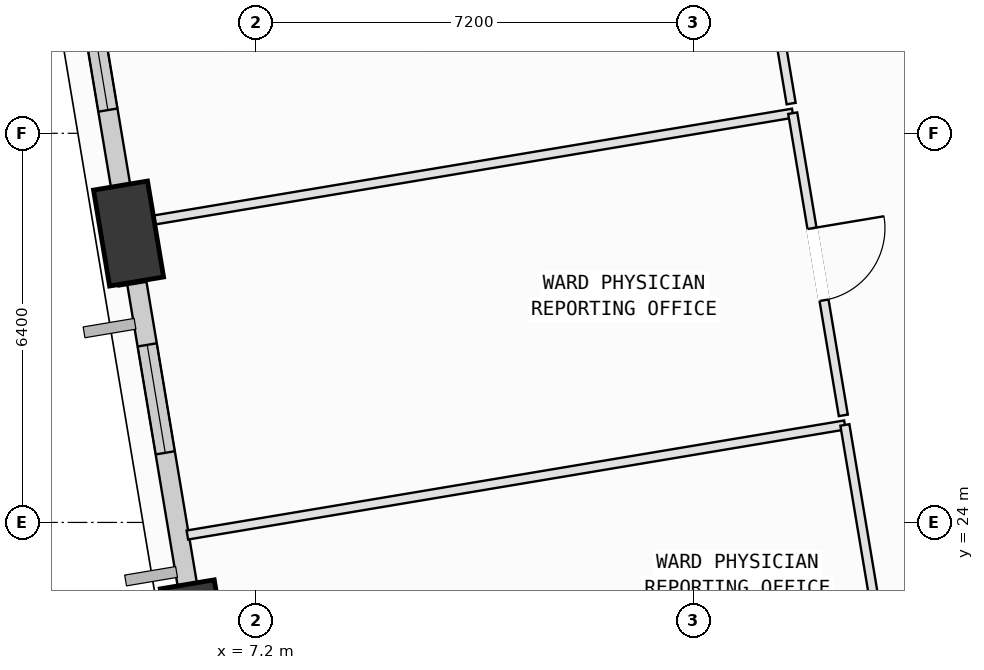
"""IFC4 building model, lengths in metres.
Left out: names, types, materials, properties, quantities, classifications, styles, units other than length and angle.
Written with IfcOpenShell. Run it as: python <this file> out.ifc"""

import sys

from ifc_helpers import new_model, si_unit, direction, frame, frame_2d, origin, origin_2d, place, context, subcontext, project, spatial, rectangle, extrude, element, fill, save


model = new_model("IFC4")
c1 = context("Model", 3, precision=1e-05, world=origin(), true_north=direction((0.0, 1.0)))
c2 = subcontext(c1, "Body", "Model", "MODEL_VIEW")
j1 = project(units=[si_unit("LENGTHUNIT", "METRE"), si_unit("PLANEANGLEUNIT", "RADIAN")], contexts=[c1])
p1 = place(None, origin())
s1 = spatial("IfcSite", under=j1, at=p1, CompositionType="ELEMENT")
p2 = place(p1, origin())
s2 = spatial("IfcBuilding", under=s1, at=p2, CompositionType="ELEMENT")
p3 = place(p2, frame((0.0, 0.0, 63.0)))
s3 = spatial("IfcBuildingStorey", under=s2, at=p3, CompositionType="ELEMENT", Elevation=63.0)
p4 = place(p3, frame((5.107, 28.751, 0.002), z_axis=(-0.015285797262, -0.11737308612, 0.992970242785), x_axis=(-0.03719000177, 0.99246584417, 0.116740960783)))
e1 = element("IfcColumn", 1, at=p4, inside=s3, PredefinedType="COLUMN", context=c2, shape_type="SweptSolid", body=[
    extrude(rectangle(XDim=1.6, YDim=0.9, at=origin_2d()), origin(), (0.0, 0.0, 1.0), 4.025),
])
p5 = place(p3, frame((6.205, 22.192, 0.002), z_axis=(0.011713921477, -0.112708560528, 0.993559039226), x_axis=(-0.265463218186, 0.957621337914, 0.111761589836)))
e2 = element("IfcColumn", 2, at=p5, inside=s3, PredefinedType="COLUMN", context=c2, shape_type="SweptSolid", body=[
    extrude(rectangle(XDim=1.6, YDim=0.9, at=origin_2d()), origin(), (0.0, 0.0, 1.0), 4.022),
])
p6 = place(p3, frame((5.045, 29.122, 0.0), z_axis=(0.0, 0.0, 1.0), x_axis=(-0.165007424724, 0.986292324712, 0.0)))
e3 = element("IfcWall", 3, at=p6, inside=s3, PredefinedType="SOLIDWALL", context=c2, shape_type="SweptSolid", body=[
    extrude(rectangle(XDim=5.4, YDim=0.32, at=frame_2d((2.7, 0.0))), origin(), (0.0, 0.0, 1.0), 3.165),
])
p7 = place(p6, frame((1.683, 0.0, 0.75)))
e4 = element("IfcOpeningElement", 4, at=p7, cuts=e3, PredefinedType="OPENING", context=c2, shape_type="SweptSolid", body=[
    extrude(rectangle(XDim=1.4, YDim=1.85, at=frame_2d((0.7, 0.925))), frame((0.0, 0.17, 0.0), z_axis=(0.0, -1.0, 0.0), x_axis=(1.0, 0.0, 0.0)), (0.0, 0.0, 1.0), 0.34),
])
p8 = place(p3, frame((6.142, 22.567, 0.0), z_axis=(0.0, 0.0, 1.0), x_axis=(-0.165032330443, 0.986288157644, 0.0)))
e5 = element("IfcWall", 5, at=p8, inside=s3, PredefinedType="SOLIDWALL", context=c2, shape_type="SweptSolid", body=[
    extrude(rectangle(XDim=5.438, YDim=0.32, at=frame_2d((2.719, 0.0))), origin(), (0.0, 0.0, 1.0), 3.165),
])
p9 = place(p8, frame((2.613, 0.0, 0.75)))
e6 = element("IfcOpeningElement", 6, at=p9, cuts=e5, PredefinedType="OPENING", context=c2, shape_type="SweptSolid", body=[
    extrude(rectangle(XDim=1.8, YDim=2.05, at=frame_2d((0.9, 1.025))), frame((0.0, 0.17, 0.0), z_axis=(0.0, -1.0, 0.0), x_axis=(1.0, 0.0, 0.0)), (0.0, 0.0, 1.0), 0.34),
])
p10 = place(p3, frame((6.074, 23.793, 0.0), z_axis=(0.0, 0.0, 1.0), x_axis=(0.986279342954, 0.165085001324, 0.0)))
e7 = element("IfcWall", 7, at=p10, inside=s3, PredefinedType="PARTITIONING", context=c2, shape_type="SweptSolid", body=[
    extrude(rectangle(XDim=10.964, YDim=0.15, at=frame_2d((5.482, 0.0))), origin(), (0.0, 0.0, 1.0), 3.78),
])
p11 = place(p3, frame((16.888, 25.603, 0.0), z_axis=(0.0, 0.0, 1.0), x_axis=(0.165082339721, -0.986279788454, 0.0)))
e8 = element("IfcWall", 8, at=p11, inside=s3, PredefinedType="PARTITIONING", context=c2, shape_type="SweptSolid", body=[
    extrude(rectangle(XDim=5.04, YDim=0.15, at=frame_2d((2.52, 0.0))), origin(), (0.0, 0.0, 1.0), 3.78),
])
p12 = place(p3, frame((4.855, 28.861, 0.0), z_axis=(0.0, 0.0, 1.0), x_axis=(0.986288313617, 0.165031398291, 0.0)))
e9 = element("IfcWall", 9, at=p12, inside=s3, PredefinedType="PARTITIONING", context=c2, shape_type="SweptSolid", body=[
    extrude(rectangle(XDim=11.33, YDim=0.15, at=frame_2d((5.665, 0.0))), origin(), (0.0, 0.0, 1.0), 3.78),
])
p13 = place(p3, frame((16.03, 30.731, 0.0), z_axis=(0.0, 0.0, 1.0), x_axis=(0.165113892935, -0.986274506595, 0.0)))
e10 = element("IfcWall", 10, at=p13, inside=s3, PredefinedType="PARTITIONING", context=c2, shape_type="SweptSolid", body=[
    extrude(rectangle(XDim=5.039, YDim=0.15, at=frame_2d((2.52, 0.0))), origin(), (0.0, 0.0, 1.0), 3.78),
])
p14 = place(p13, frame((1.92, 0.0, 0.0)))
e11 = element("IfcOpeningElement", 11, at=p14, cuts=e10, PredefinedType="OPENING", context=c2, shape_type="SweptSolid", body=[
    extrude(rectangle(XDim=1.2, YDim=2.15, at=frame_2d((0.6, 1.075))), frame((0.0, 0.085, 0.0), z_axis=(0.0, -1.0, 0.0), x_axis=(1.0, 0.0, 0.0)), (0.0, 0.0, 1.0), 0.17),
])
p15 = place(p3, frame((5.017, 27.893, 0.0), z_axis=(0.0, 0.0, 1.0), x_axis=(-0.165165334955, 0.98626589322, 0.0)))
e12 = element("IfcWall", 12, at=p15, inside=s3, PredefinedType="PARTITIONING", context=c2, shape_type="SweptSolid", body=[
    extrude(rectangle(XDim=0.981, YDim=0.15, at=frame_2d((0.491, 0.0))), origin(), (0.0, 0.0, 1.0), 3.165),
])
p16 = place(p3, frame((15.172, 35.86, 0.0), z_axis=(0.0, 0.0, 1.0), x_axis=(0.165027335267, -0.986288993457, 0.0)))
e13 = element("IfcWall", 13, at=p16, inside=s3, PredefinedType="PARTITIONING", context=c2, shape_type="SweptSolid", body=[
    extrude(rectangle(XDim=5.04, YDim=0.15, at=frame_2d((2.52, 0.0))), origin(), (0.0, 0.0, 1.0), 3.78),
])
p17 = place(p16, frame((1.92, 0.0, 0.0)))
e14 = element("IfcOpeningElement", 14, at=p17, cuts=e13, PredefinedType="OPENING", context=c2, shape_type="SweptSolid", body=[
    extrude(rectangle(XDim=1.2, YDim=2.15, at=frame_2d((0.6, 1.075))), frame((0.0, 0.085, 0.0), z_axis=(0.0, -1.0, 0.0), x_axis=(1.0, 0.0, 0.0)), (0.0, 0.0, 1.0), 0.17),
])
p18 = place(p7, origin())
e15 = element("IfcWindow", 15, at=p18, inside=s3, PartitioningType="SINGLE_PANEL", PredefinedType="WINDOW", context=c2, shape_type="SweptSolid", body=[
    extrude(rectangle(XDim=1.4, YDim=1.85, at=frame_2d((0.7, 0.925))), frame((0.0, 0.03, 0.0), z_axis=(0.0, -1.0, 0.0), x_axis=(1.0, 0.0, 0.0)), (0.0, 0.0, 1.0), 0.06),
])
fill(e4, e15)
p19 = place(p9, origin())
e16 = element("IfcWindow", 16, at=p19, inside=s3, PartitioningType="SINGLE_PANEL", PredefinedType="WINDOW", context=c2, shape_type="SweptSolid", body=[
    extrude(rectangle(XDim=1.8, YDim=2.05, at=frame_2d((0.9, 1.025))), frame((0.0, 0.03, 0.0), z_axis=(0.0, -1.0, 0.0), x_axis=(1.0, 0.0, 0.0)), (0.0, 0.0, 1.0), 0.06),
])
fill(e6, e16)
p20 = place(p14, origin())
e17 = element("IfcDoor", 17, at=p20, inside=s3, OperationType="SINGLE_SWING_LEFT", PredefinedType="DOOR", context=c2, shape_type="SweptSolid", body=[
    extrude(rectangle(XDim=1.2, YDim=2.15, at=frame_2d((0.6, 1.075))), frame((0.0, 0.025, 0.0), z_axis=(0.0, -1.0, 0.0), x_axis=(1.0, 0.0, 0.0)), (0.0, 0.0, 1.0), 0.05),
])
fill(e11, e17)
save(model, sys.argv[1])
